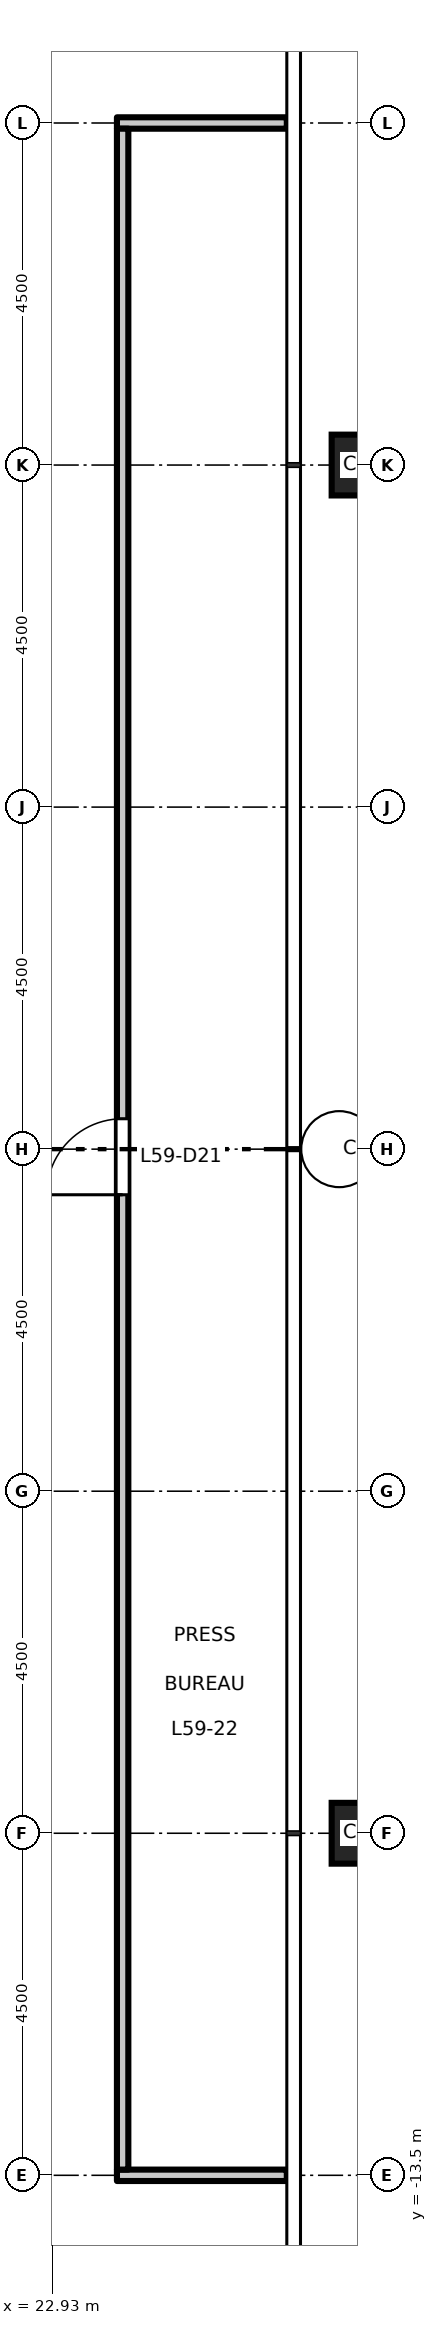
"""IFC4 building model, lengths in metres.
Left out: names, types, materials, properties, quantities, classifications, styles, units other than length and angle.
Written with IfcOpenShell. Run it as: python <this file> out.ifc"""

import sys

from ifc_helpers import new_model, si_unit, direction, frame, frame_2d, origin, origin_2d, place, context, subcontext, project, spatial, rectangle, hollow_rectangle, extrude, element, fill, save


model = new_model("IFC4")
c1 = context("Model", 3, precision=1e-05, world=origin(), true_north=direction((0.0, 1.0)))
c2 = subcontext(c1, "Body", "Model", "MODEL_VIEW")
j1 = project(units=[si_unit("LENGTHUNIT", "METRE"), si_unit("PLANEANGLEUNIT", "RADIAN")], contexts=[c1])
p1 = place(None, origin())
s1 = spatial("IfcSite", under=j1, at=p1, CompositionType="ELEMENT")
p2 = place(p1, origin())
s2 = spatial("IfcBuilding", under=s1, at=p2, CompositionType="ELEMENT")
p3 = place(p2, frame((0.0, 0.0, 273.7)))
s3 = spatial("IfcBuildingStorey", under=s2, at=p3, CompositionType="ELEMENT", Elevation=273.7)
for number, where, z_axis, x_axis in (
    (1, (27.0, -9.0, 0.0), (0.0, 0.0, 1.0), (1.0, 0.0, 0.0)),
    (2, (27.0, 0.0, 0.0), (0.0, 0.0, 1.0), (1.0, 0.0, 0.0)),
    (3, (27.0, 9.0, 0.0), (0.0, 0.0, 1.0), (1.0, 0.0, 0.0)),
):
    element("IfcColumn", number, at=place(p3, frame(where, z_axis=z_axis, x_axis=x_axis)), inside=s3, PredefinedType="COLUMN", context=c2, shape_type="SweptSolid", body=[
        extrude(hollow_rectangle(XDim=0.8, YDim=0.8, WallThickness=0.045, at=origin_2d()), origin(), (0.0, 0.0, 1.0), 4.5),
    ])
p4 = place(p3, frame((23.775, -13.5, 0.0), z_axis=(0.0, 0.0, 1.0), x_axis=(1.0, 0.0, 0.0)))
e4 = element("IfcWall", 4, at=p4, inside=s3, PredefinedType="PARTITIONING", context=c2, shape_type="SweptSolid", body=[
    extrude(rectangle(XDim=2.235, YDim=0.15, at=frame_2d((1.118, 0.0))), origin(), (0.0, 0.0, 1.0), 3.9),
])
p5 = place(p3, frame((23.775, 13.5, 0.0), z_axis=(0.0, 0.0, 1.0), x_axis=(1.0, 0.0, 0.0)))
e5 = element("IfcWall", 5, at=p5, inside=s3, PredefinedType="PARTITIONING", context=c2, shape_type="SweptSolid", body=[
    extrude(rectangle(XDim=2.235, YDim=0.15, at=frame_2d((1.118, 0.0))), origin(), (0.0, 0.0, 1.0), 4.3),
])
p6 = place(p3, frame((23.85, -13.425, 0.0), z_axis=(0.0, 0.0, 1.0), x_axis=(0.0, 1.0, 0.0)))
e6 = element("IfcWall", 6, at=p6, inside=s3, PredefinedType="PARTITIONING", context=c2, shape_type="SweptSolid", body=[
    extrude(rectangle(XDim=26.85, YDim=0.15, at=frame_2d((13.425, 0.0))), origin(), (0.0, 0.0, 1.0), 4.3),
])
p7 = place(p6, frame((12.825, 0.0, 0.0)))
e7 = element("IfcOpeningElement", 7, at=p7, cuts=e6, PredefinedType="OPENING", context=c2, shape_type="SweptSolid", body=[
    extrude(rectangle(XDim=1.0, YDim=2.1, at=frame_2d((0.5, 1.05))), frame((0.0, 0.085, 0.0), z_axis=(0.0, -1.0, 0.0), x_axis=(1.0, 0.0, 0.0)), (0.0, 0.0, 1.0), 0.17),
])
p8 = place(p7, origin())
e8 = element("IfcDoor", 8, at=p8, inside=s3, OperationType="SINGLE_SWING_LEFT", PredefinedType="DOOR", context=c2, shape_type="SweptSolid", body=[
    extrude(rectangle(XDim=1.0, YDim=2.1, at=frame_2d((0.5, 1.05))), frame((0.0, 0.025, 0.0), z_axis=(0.0, -1.0, 0.0), x_axis=(1.0, 0.0, 0.0)), (0.0, 0.0, 1.0), 0.05),
])
fill(e7, e8)
save(model, sys.argv[1])
